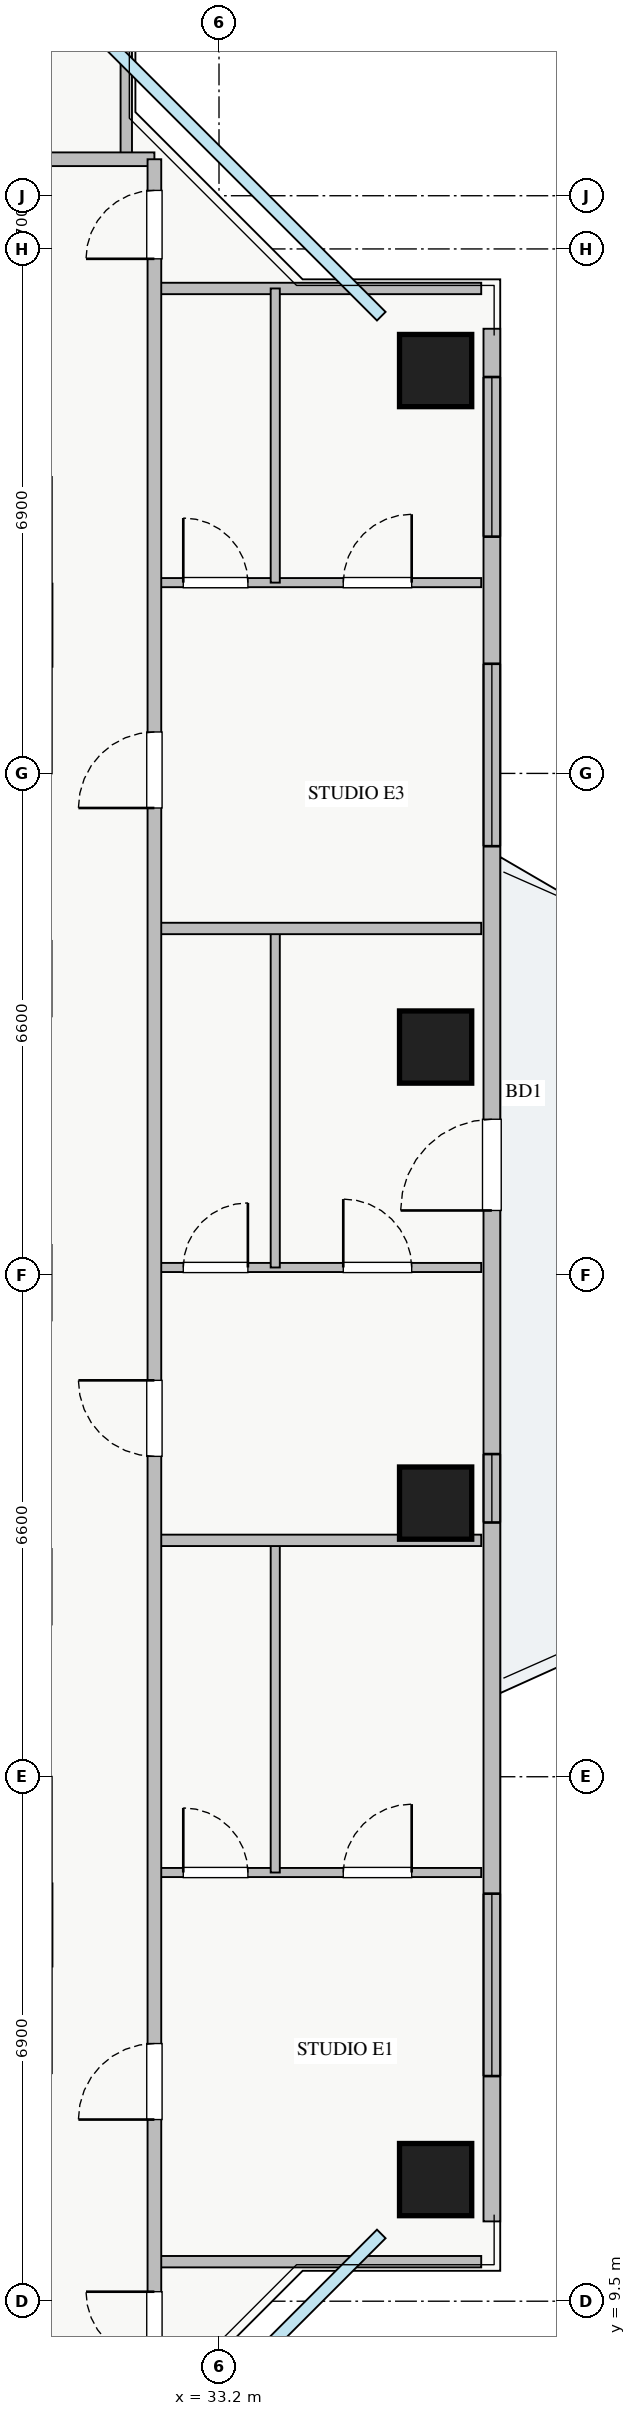
"""IFC4 building model, lengths in metres.
Left out: names, types, materials, properties, quantities, classifications, styles, units other than length and angle.
Written with IfcOpenShell. Run it as: python <this file> out.ifc"""

import sys

from ifc_helpers import new_model, si_unit, direction, frame, frame_2d, origin, origin_2d, place, context, subcontext, project, spatial, rectangle, extrude, source, transform, mapped, element, fill, save


model = new_model("IFC4")
c1 = context("Model", 3, precision=1e-05, world=origin(), true_north=direction((0.0, 1.0)))
c2 = subcontext(c1, "Body", "Model", "MODEL_VIEW")
j1 = project(units=[si_unit("LENGTHUNIT", "METRE"), si_unit("PLANEANGLEUNIT", "RADIAN")], contexts=[c1])
p1 = place(None, origin())
s1 = spatial("IfcSite", under=j1, at=p1, CompositionType="ELEMENT")
p2 = place(p1, origin())
s2 = spatial("IfcBuilding", under=s1, at=p2, CompositionType="ELEMENT")
p3 = place(p2, frame((0.0, 0.0, 179.5)))
s3 = spatial("IfcBuildingStorey", under=s2, at=p3, CompositionType="ELEMENT", Elevation=179.5)
m1 = source(origin(), c2, "Body", "SweptSolid", [
    extrude(rectangle(XDim=0.95, YDim=0.95, at=origin_2d()), origin(), (0.0, 0.0, 1.0), 3.25),
])
for number, where, z_axis, x_axis in (
    (1, (36.05, 11.1, 0.0), (0.0, 0.0, 1.0), (1.0, 0.0, 0.0)),
    (2, (36.05, 20.0, 0.0), (0.0, 0.0, 1.0), (1.0, 0.0, 0.0)),
    (3, (36.05, 26.0, 0.0), (0.0, 0.0, 1.0), (1.0, 0.0, 0.0)),
    (4, (36.05, 34.9, 0.0), (0.0, 0.0, 1.0), (1.0, 0.0, 0.0)),
):
    element("IfcColumn", number, at=place(p3, frame(where, z_axis=z_axis, x_axis=x_axis)), inside=s3, PredefinedType="COLUMN", context=c2, shape_type="MappedRepresentation", body=[
        mapped(m1, transform((0.0, 0.0, 0.0), x_axis=(1.0, 0.0, 0.0), y_axis=(0.0, 1.0, 0.0), z_axis=(0.0, 0.0, 1.0), scale=1.0)),
    ])
p4 = place(p3, frame((36.79, 10.55, 0.0), z_axis=(0.0, 0.0, 1.0), x_axis=(0.0, 1.0, 0.0)))
e5 = element("IfcWall", 5, at=p4, inside=s3, PredefinedType="STANDARD", context=c2, shape_type="SweptSolid", body=[
    extrude(rectangle(XDim=24.9, YDim=0.22, at=frame_2d((12.45, 0.0))), origin(), (0.0, 0.0, 1.0), 2.61),
])
p5 = place(p4, frame((13.3, 0.0, 0.0)))
e6 = element("IfcOpeningElement", 6, at=p5, cuts=e5, PredefinedType="OPENING", context=c2, shape_type="SweptSolid", body=[
    extrude(rectangle(XDim=1.2, YDim=2.1, at=frame_2d((0.6, 1.05))), frame((0.0, 0.12, 0.0), z_axis=(0.0, -1.0, 0.0), x_axis=(1.0, 0.0, 0.0)), (0.0, 0.0, 1.0), 0.24),
])
p6 = place(p4, frame((1.912, 0.0, 0.9)))
e7 = element("IfcOpeningElement", 7, at=p6, cuts=e5, PredefinedType="OPENING", context=c2, shape_type="SweptSolid", body=[
    extrude(rectangle(XDim=2.4, YDim=1.48, at=frame_2d((1.2, 0.74))), frame((0.0, 0.12, 0.0), z_axis=(0.0, -1.0, 0.0), x_axis=(1.0, 0.0, 0.0)), (0.0, 0.0, 1.0), 0.24),
])
p7 = place(p4, frame((22.165, 0.0, 0.9)))
e8 = element("IfcOpeningElement", 8, at=p7, cuts=e5, PredefinedType="OPENING", context=c2, shape_type="SweptSolid", body=[
    extrude(rectangle(XDim=2.1, YDim=1.5, at=frame_2d((1.05, 0.75))), frame((0.0, 0.12, 0.0), z_axis=(0.0, -1.0, 0.0), x_axis=(1.0, 0.0, 0.0)), (0.0, 0.0, 1.0), 0.24),
])
p8 = place(p4, frame((18.093, 0.0, 0.9)))
e9 = element("IfcOpeningElement", 9, at=p8, cuts=e5, PredefinedType="OPENING", context=c2, shape_type="SweptSolid", body=[
    extrude(rectangle(XDim=2.4, YDim=1.5, at=frame_2d((1.2, 0.75))), frame((0.0, 0.12, 0.0), z_axis=(0.0, -1.0, 0.0), x_axis=(1.0, 0.0, 0.0)), (0.0, 0.0, 1.0), 0.24),
])
p9 = place(p4, frame((9.195, 0.0, 0.9)))
e10 = element("IfcOpeningElement", 10, at=p9, cuts=e5, PredefinedType="OPENING", context=c2, shape_type="SweptSolid", body=[
    extrude(rectangle(XDim=0.9, YDim=1.2, at=frame_2d((0.45, 0.6))), frame((0.0, 0.12, 0.0), z_axis=(0.0, -1.0, 0.0), x_axis=(1.0, 0.0, 0.0)), (0.0, 0.0, 1.0), 0.24),
])
p10 = place(p3, frame((31.98, 37.68, 0.0), z_axis=(0.0, 0.0, 1.0), x_axis=(0.0, 1.0, 0.0)))
e11 = element("IfcWall", 11, at=p10, inside=s3, PredefinedType="PARTITIONING", context=c2, shape_type="SweptSolid", body=[
    extrude(rectangle(XDim=2.97, YDim=0.15, at=frame_2d((1.485, 0.0))), origin(), (0.0, 0.0, 1.0), 3.07),
])
p11 = place(p3, frame((8.72, 37.68, 0.0), z_axis=(0.0, 0.0, 1.0), x_axis=(1.0, 0.0, 0.0)))
e12 = element("IfcWall", 12, at=p11, inside=s3, PredefinedType="PARTITIONING", context=c2, shape_type="SweptSolid", body=[
    extrude(rectangle(XDim=23.63, YDim=0.18, at=frame_2d((11.815, 0.0))), origin(), (0.0, 0.0, 1.0), 3.07),
])
p12 = place(p11, frame((2.83, 0.0, 0.0)))
e13 = element("IfcOpeningElement", 13, at=p12, cuts=e12, PredefinedType="OPENING", context=c2, shape_type="SweptSolid", body=[
    extrude(rectangle(XDim=1.0, YDim=2.05, at=frame_2d((0.5, 1.025))), frame((0.0, 0.1, 0.0), z_axis=(0.0, -1.0, 0.0), x_axis=(1.0, 0.0, 0.0)), (0.0, 0.0, 1.0), 0.2),
])
p13 = place(p11, frame((8.02, 0.0, 0.0)))
e14 = element("IfcOpeningElement", 14, at=p13, cuts=e12, PredefinedType="OPENING", context=c2, shape_type="SweptSolid", body=[
    extrude(rectangle(XDim=1.0, YDim=2.05, at=frame_2d((0.5, 1.025))), frame((0.0, 0.1, 0.0), z_axis=(0.0, -1.0, 0.0), x_axis=(1.0, 0.0, 0.0)), (0.0, 0.0, 1.0), 0.2),
])
p14 = place(p11, frame((13.41, 0.0, 0.0)))
e15 = element("IfcOpeningElement", 15, at=p14, cuts=e12, PredefinedType="OPENING", context=c2, shape_type="SweptSolid", body=[
    extrude(rectangle(XDim=1.0, YDim=2.05, at=frame_2d((0.5, 1.025))), frame((0.0, 0.1, 0.0), z_axis=(0.0, -1.0, 0.0), x_axis=(1.0, 0.0, 0.0)), (0.0, 0.0, 1.0), 0.2),
])
p15 = place(p11, frame((19.85, 0.0, 0.0)))
e16 = element("IfcOpeningElement", 16, at=p15, cuts=e12, PredefinedType="OPENING", context=c2, shape_type="SweptSolid", body=[
    extrude(rectangle(XDim=1.0, YDim=2.05, at=frame_2d((0.5, 1.025))), frame((0.0, 0.1, 0.0), z_axis=(0.0, -1.0, 0.0), x_axis=(1.0, 0.0, 0.0)), (0.0, 0.0, 1.0), 0.2),
])
for number, where, z_axis, x_axis in (
    (17, (32.35, 35.98, 0.0), (0.0, 0.0, 1.0), (1.0, 0.0, 0.0)),
    (18, (32.35, 10.02, 0.0), (0.0, 0.0, 1.0), (1.0, 0.0, 0.0)),
):
    element("IfcWall", number, at=place(p3, frame(where, z_axis=z_axis, x_axis=x_axis)), inside=s3, PredefinedType="PARTITIONING", context=c2, shape_type="SweptSolid", body=[
        extrude(rectangle(XDim=4.3, YDim=0.15, at=frame_2d((2.15, 0.0))), origin(), (0.0, 0.0, 1.0), 3.07),
    ])
p16 = place(p3, frame((32.35, 15.14, 0.0), z_axis=(0.0, 0.0, 1.0), x_axis=(1.0, 0.0, 0.0)))
e19 = element("IfcWall", 19, at=p16, inside=s3, PredefinedType="PLUMBINGWALL", context=c2, shape_type="SweptSolid", body=[
    extrude(rectangle(XDim=4.3, YDim=0.12, at=frame_2d((2.15, 0.0))), origin(), (0.0, 0.0, 1.0), 3.07),
])
p17 = place(p16, frame((0.38, 0.0, 0.0)))
e20 = element("IfcOpeningElement", 20, at=p17, cuts=e19, PredefinedType="OPENING", context=c2, shape_type="SweptSolid", body=[
    extrude(rectangle(XDim=0.85, YDim=2.05, at=frame_2d((0.425, 1.025))), frame((0.0, 0.07, 0.0), z_axis=(0.0, -1.0, 0.0), x_axis=(1.0, 0.0, 0.0)), (0.0, 0.0, 1.0), 0.14),
])
p18 = place(p16, frame((2.485, 0.0, 0.0)))
e21 = element("IfcOpeningElement", 21, at=p18, cuts=e19, PredefinedType="OPENING", context=c2, shape_type="SweptSolid", body=[
    extrude(rectangle(XDim=0.9, YDim=2.05, at=frame_2d((0.45, 1.025))), frame((0.0, 0.07, 0.0), z_axis=(0.0, -1.0, 0.0), x_axis=(1.0, 0.0, 0.0)), (0.0, 0.0, 1.0), 0.14),
])
p19 = place(p3, frame((33.94, 15.14, 0.0), z_axis=(0.0, 0.0, 1.0), x_axis=(0.0, 1.0, 0.0)))
e22 = element("IfcWall", 22, at=p19, inside=s3, PredefinedType="PLUMBINGWALL", context=c2, shape_type="SweptSolid", body=[
    extrude(rectangle(XDim=4.37, YDim=0.12, at=frame_2d((2.185, 0.0))), origin(), (0.0, 0.0, 1.0), 3.07),
])
p20 = place(p3, frame((32.35, 23.1, 0.0), z_axis=(0.0, 0.0, 1.0), x_axis=(1.0, 0.0, 0.0)))
e23 = element("IfcWall", 23, at=p20, inside=s3, PredefinedType="PLUMBINGWALL", context=c2, shape_type="SweptSolid", body=[
    extrude(rectangle(XDim=4.3, YDim=0.12, at=frame_2d((2.15, 0.0))), origin(), (0.0, 0.0, 1.0), 3.07),
])
p21 = place(p20, frame((0.38, 0.0, 0.0)))
e24 = element("IfcOpeningElement", 24, at=p21, cuts=e23, PredefinedType="OPENING", context=c2, shape_type="SweptSolid", body=[
    extrude(rectangle(XDim=0.85, YDim=2.05, at=frame_2d((0.425, 1.025))), frame((0.0, 0.07, 0.0), z_axis=(0.0, -1.0, 0.0), x_axis=(1.0, 0.0, 0.0)), (0.0, 0.0, 1.0), 0.14),
])
p22 = place(p20, frame((2.485, 0.0, 0.0)))
e25 = element("IfcOpeningElement", 25, at=p22, cuts=e23, PredefinedType="OPENING", context=c2, shape_type="SweptSolid", body=[
    extrude(rectangle(XDim=0.9, YDim=2.05, at=frame_2d((0.45, 1.025))), frame((0.0, 0.07, 0.0), z_axis=(0.0, -1.0, 0.0), x_axis=(1.0, 0.0, 0.0)), (0.0, 0.0, 1.0), 0.14),
])
p23 = place(p3, frame((33.94, 23.1, 0.0), z_axis=(0.0, 0.0, 1.0), x_axis=(0.0, 1.0, 0.0)))
e26 = element("IfcWall", 26, at=p23, inside=s3, PredefinedType="PLUMBINGWALL", context=c2, shape_type="SweptSolid", body=[
    extrude(rectangle(XDim=4.46, YDim=0.12, at=frame_2d((2.23, 0.0))), origin(), (0.0, 0.0, 1.0), 3.07),
])
p24 = place(p3, frame((32.35, 19.51, 0.0), z_axis=(0.0, 0.0, 1.0), x_axis=(1.0, 0.0, 0.0)))
e27 = element("IfcWall", 27, at=p24, inside=s3, PredefinedType="PARTITIONING", context=c2, shape_type="SweptSolid", body=[
    extrude(rectangle(XDim=4.3, YDim=0.15, at=frame_2d((2.15, 0.0))), origin(), (0.0, 0.0, 1.0), 3.07),
])
p25 = place(p3, frame((32.35, 32.11, 0.0), z_axis=(0.0, 0.0, 1.0), x_axis=(1.0, 0.0, 0.0)))
e28 = element("IfcWall", 28, at=p25, inside=s3, PredefinedType="PLUMBINGWALL", context=c2, shape_type="SweptSolid", body=[
    extrude(rectangle(XDim=4.3, YDim=0.12, at=frame_2d((2.15, 0.0))), origin(), (0.0, 0.0, 1.0), 3.07),
])
p26 = place(p25, frame((0.38, 0.0, 0.0)))
e29 = element("IfcOpeningElement", 29, at=p26, cuts=e28, PredefinedType="OPENING", context=c2, shape_type="SweptSolid", body=[
    extrude(rectangle(XDim=0.85, YDim=2.05, at=frame_2d((0.425, 1.025))), frame((0.0, 0.07, 0.0), z_axis=(0.0, -1.0, 0.0), x_axis=(1.0, 0.0, 0.0)), (0.0, 0.0, 1.0), 0.14),
])
p27 = place(p25, frame((2.485, 0.0, 0.0)))
e30 = element("IfcOpeningElement", 30, at=p27, cuts=e28, PredefinedType="OPENING", context=c2, shape_type="SweptSolid", body=[
    extrude(rectangle(XDim=0.9, YDim=2.05, at=frame_2d((0.45, 1.025))), frame((0.0, 0.07, 0.0), z_axis=(0.0, -1.0, 0.0), x_axis=(1.0, 0.0, 0.0)), (0.0, 0.0, 1.0), 0.14),
])
p28 = place(p3, frame((33.94, 32.11, 0.0), z_axis=(0.0, 0.0, 1.0), x_axis=(0.0, 1.0, 0.0)))
e31 = element("IfcWall", 31, at=p28, inside=s3, PredefinedType="PLUMBINGWALL", context=c2, shape_type="SweptSolid", body=[
    extrude(rectangle(XDim=3.87, YDim=0.12, at=frame_2d((1.935, 0.0))), origin(), (0.0, 0.0, 1.0), 3.07),
])
p29 = place(p3, frame((32.35, 27.56, 0.0), z_axis=(0.0, 0.0, 1.0), x_axis=(1.0, 0.0, 0.0)))
e32 = element("IfcWall", 32, at=p29, inside=s3, PredefinedType="PARTITIONING", context=c2, shape_type="SweptSolid", body=[
    extrude(rectangle(XDim=4.3, YDim=0.15, at=frame_2d((2.15, 0.0))), origin(), (0.0, 0.0, 1.0), 3.07),
])
p30 = place(p3, frame((32.35, 8.31, 0.0), z_axis=(0.0, 0.0, 1.0), x_axis=(0.0, 1.0, 0.0)))
e33 = element("IfcWall", 33, at=p30, inside=s3, PredefinedType="PARTITIONING", context=c2, shape_type="SweptSolid", body=[
    extrude(rectangle(XDim=29.37, YDim=0.18, at=frame_2d((14.685, 0.0))), origin(), (0.0, 0.0, 1.0), 3.07),
])
p31 = place(p30, frame((28.06, 0.0, 0.0)))
e34 = element("IfcOpeningElement", 34, at=p31, cuts=e33, PredefinedType="OPENING", context=c2, shape_type="SweptSolid", body=[
    extrude(rectangle(XDim=0.9, YDim=2.05, at=frame_2d((0.45, 1.025))), frame((0.0, 0.1, 0.0), z_axis=(0.0, -1.0, 0.0), x_axis=(1.0, 0.0, 0.0)), (0.0, 0.0, 1.0), 0.2),
])
p32 = place(p30, frame((0.415, 0.0, 0.0)))
e35 = element("IfcOpeningElement", 35, at=p32, cuts=e33, PredefinedType="OPENING", context=c2, shape_type="SweptSolid", body=[
    extrude(rectangle(XDim=0.9, YDim=2.05, at=frame_2d((0.45, 1.025))), frame((0.0, 0.1, 0.0), z_axis=(0.0, -1.0, 0.0), x_axis=(1.0, 0.0, 0.0)), (0.0, 0.0, 1.0), 0.2),
])
p33 = place(p30, frame((3.58, 0.0, 0.0)))
e36 = element("IfcOpeningElement", 36, at=p33, cuts=e33, PredefinedType="OPENING", context=c2, shape_type="SweptSolid", body=[
    extrude(rectangle(XDim=1.0, YDim=2.05, at=frame_2d((0.5, 1.025))), frame((0.0, 0.1, 0.0), z_axis=(0.0, -1.0, 0.0), x_axis=(1.0, 0.0, 0.0)), (0.0, 0.0, 1.0), 0.2),
])
p34 = place(p30, frame((12.305, 0.0, 0.0)))
e37 = element("IfcOpeningElement", 37, at=p34, cuts=e33, PredefinedType="OPENING", context=c2, shape_type="SweptSolid", body=[
    extrude(rectangle(XDim=1.0, YDim=2.05, at=frame_2d((0.5, 1.025))), frame((0.0, 0.1, 0.0), z_axis=(0.0, -1.0, 0.0), x_axis=(1.0, 0.0, 0.0)), (0.0, 0.0, 1.0), 0.2),
])
p35 = place(p30, frame((20.835, 0.0, 0.0)))
e38 = element("IfcOpeningElement", 38, at=p35, cuts=e33, PredefinedType="OPENING", context=c2, shape_type="SweptSolid", body=[
    extrude(rectangle(XDim=1.0, YDim=2.05, at=frame_2d((0.5, 1.025))), frame((0.0, 0.1, 0.0), z_axis=(0.0, -1.0, 0.0), x_axis=(1.0, 0.0, 0.0)), (0.0, 0.0, 1.0), 0.2),
])
m2 = source(origin(), c2, "Body", "SweptSolid", [
    extrude(rectangle(XDim=1.2, YDim=2.1, at=frame_2d((0.6, 1.05))), frame((0.0, 0.025, 0.0), z_axis=(0.0, -1.0, 0.0), x_axis=(1.0, 0.0, 0.0)), (0.0, 0.0, 1.0), 0.05),
])
p36 = place(p5, origin())
e39 = element("IfcDoor", 39, at=p36, inside=s3, OperationType="SINGLE_SWING_LEFT", PredefinedType="DOOR", context=c2, shape_type="MappedRepresentation", body=[
    mapped(m2, transform((0.0, 0.0, 0.0), x_axis=(1.0, 0.0, 0.0), y_axis=(0.0, 1.0, 0.0), z_axis=(0.0, 0.0, 1.0), scale=1.0)),
])
fill(e6, e39)
m3 = source(origin(), c2, "Body", "SweptSolid", [
    extrude(rectangle(XDim=2.4, YDim=1.48, at=frame_2d((1.2, 0.74))), frame((0.0, 0.03, 0.0), z_axis=(0.0, -1.0, 0.0), x_axis=(1.0, 0.0, 0.0)), (0.0, 0.0, 1.0), 0.06),
])
p37 = place(p6, origin())
e40 = element("IfcWindow", 40, at=p37, inside=s3, PartitioningType="TRIPLE_PANEL_VERTICAL", PredefinedType="WINDOW", context=c2, shape_type="MappedRepresentation", body=[
    mapped(m3, transform((0.0, 0.0, 0.0), x_axis=(1.0, 0.0, 0.0), y_axis=(0.0, 1.0, 0.0), z_axis=(0.0, 0.0, 1.0), scale=1.0)),
])
fill(e7, e40)
m4 = source(origin(), c2, "Body", "SweptSolid", [
    extrude(rectangle(XDim=2.1, YDim=1.5, at=frame_2d((1.05, 0.75))), frame((0.0, 0.03, 0.0), z_axis=(0.0, -1.0, 0.0), x_axis=(1.0, 0.0, 0.0)), (0.0, 0.0, 1.0), 0.06),
])
p38 = place(p7, origin())
e41 = element("IfcWindow", 41, at=p38, inside=s3, PartitioningType="TRIPLE_PANEL_VERTICAL", PredefinedType="WINDOW", context=c2, shape_type="MappedRepresentation", body=[
    mapped(m4, transform((0.0, 0.0, 0.0), x_axis=(1.0, 0.0, 0.0), y_axis=(0.0, 1.0, 0.0), z_axis=(0.0, 0.0, 1.0), scale=1.0)),
])
fill(e8, e41)
m5 = source(origin(), c2, "Body", "SweptSolid", [
    extrude(rectangle(XDim=0.85, YDim=2.05, at=frame_2d((0.425, 1.025))), frame((0.0, 0.025, 0.0), z_axis=(0.0, -1.0, 0.0), x_axis=(1.0, 0.0, 0.0)), (0.0, 0.0, 1.0), 0.05),
])
p39 = place(p17, origin())
e42 = element("IfcDoor", 42, at=p39, inside=s3, OperationType="SINGLE_SWING_LEFT", PredefinedType="DOOR", context=c2, shape_type="MappedRepresentation", body=[
    mapped(m5, transform((0.0, 0.0, 0.0), x_axis=(1.0, 0.0, 0.0), y_axis=(0.0, 1.0, 0.0), z_axis=(0.0, 0.0, 1.0), scale=1.0)),
])
fill(e20, e42)
m6 = source(origin(), c2, "Body", "SweptSolid", [
    extrude(rectangle(XDim=0.9, YDim=2.05, at=frame_2d((0.45, 1.025))), frame((0.0, 0.025, 0.0), z_axis=(0.0, -1.0, 0.0), x_axis=(1.0, 0.0, 0.0)), (0.0, 0.0, 1.0), 0.05),
])
p40 = place(p18, origin())
e43 = element("IfcDoor", 43, at=p40, inside=s3, OperationType="SINGLE_SWING_RIGHT", PredefinedType="DOOR", context=c2, shape_type="MappedRepresentation", body=[
    mapped(m6, transform((0.0, 0.0, 0.0), x_axis=(1.0, 0.0, 0.0), y_axis=(0.0, 1.0, 0.0), z_axis=(0.0, 0.0, 1.0), scale=1.0)),
])
fill(e21, e43)
p41 = place(p21, origin())
e44 = element("IfcDoor", 44, at=p41, inside=s3, OperationType="SINGLE_SWING_RIGHT", PredefinedType="DOOR", context=c2, shape_type="MappedRepresentation", body=[
    mapped(m5, transform((0.0, 0.0, 0.0), x_axis=(1.0, 0.0, 0.0), y_axis=(0.0, 1.0, 0.0), z_axis=(0.0, 0.0, 1.0), scale=1.0)),
])
fill(e24, e44)
p42 = place(p22, origin())
e45 = element("IfcDoor", 45, at=p42, inside=s3, OperationType="SINGLE_SWING_LEFT", PredefinedType="DOOR", context=c2, shape_type="MappedRepresentation", body=[
    mapped(m6, transform((0.0, 0.0, 0.0), x_axis=(1.0, 0.0, 0.0), y_axis=(0.0, 1.0, 0.0), z_axis=(0.0, 0.0, 1.0), scale=1.0)),
])
fill(e25, e45)
p43 = place(p26, origin())
e46 = element("IfcDoor", 46, at=p43, inside=s3, OperationType="SINGLE_SWING_LEFT", PredefinedType="DOOR", context=c2, shape_type="MappedRepresentation", body=[
    mapped(m5, transform((0.0, 0.0, 0.0), x_axis=(1.0, 0.0, 0.0), y_axis=(0.0, 1.0, 0.0), z_axis=(0.0, 0.0, 1.0), scale=1.0)),
])
fill(e29, e46)
p44 = place(p27, origin())
e47 = element("IfcDoor", 47, at=p44, inside=s3, OperationType="SINGLE_SWING_RIGHT", PredefinedType="DOOR", context=c2, shape_type="MappedRepresentation", body=[
    mapped(m6, transform((0.0, 0.0, 0.0), x_axis=(1.0, 0.0, 0.0), y_axis=(0.0, 1.0, 0.0), z_axis=(0.0, 0.0, 1.0), scale=1.0)),
])
fill(e30, e47)
p45 = place(p31, origin())
e48 = element("IfcDoor", 48, at=p45, inside=s3, OperationType="SINGLE_SWING_LEFT", PredefinedType="DOOR", context=c2, shape_type="MappedRepresentation", body=[
    mapped(m6, transform((0.0, 0.0, 0.0), x_axis=(1.0, 0.0, 0.0), y_axis=(0.0, 1.0, 0.0), z_axis=(0.0, 0.0, 1.0), scale=1.0)),
])
fill(e34, e48)
p46 = place(p32, origin())
e49 = element("IfcDoor", 49, at=p46, inside=s3, OperationType="SINGLE_SWING_RIGHT", PredefinedType="DOOR", context=c2, shape_type="MappedRepresentation", body=[
    mapped(m6, transform((0.0, 0.0, 0.0), x_axis=(1.0, 0.0, 0.0), y_axis=(0.0, 1.0, 0.0), z_axis=(0.0, 0.0, 1.0), scale=1.0)),
])
fill(e35, e49)
m7 = source(origin(), c2, "Body", "SweptSolid", [
    extrude(rectangle(XDim=1.0, YDim=2.05, at=frame_2d((0.5, 1.025))), frame((0.0, 0.025, 0.0), z_axis=(0.0, -1.0, 0.0), x_axis=(1.0, 0.0, 0.0)), (0.0, 0.0, 1.0), 0.05),
])
p47 = place(p33, origin())
e50 = element("IfcDoor", 50, at=p47, inside=s3, OperationType="SINGLE_SWING_LEFT", PredefinedType="DOOR", context=c2, shape_type="MappedRepresentation", body=[
    mapped(m7, transform((0.0, 0.0, 0.0), x_axis=(1.0, 0.0, 0.0), y_axis=(0.0, 1.0, 0.0), z_axis=(0.0, 0.0, 1.0), scale=1.0)),
])
fill(e36, e50)
p48 = place(p34, origin())
e51 = element("IfcDoor", 51, at=p48, inside=s3, OperationType="SINGLE_SWING_RIGHT", PredefinedType="DOOR", context=c2, shape_type="MappedRepresentation", body=[
    mapped(m7, transform((0.0, 0.0, 0.0), x_axis=(1.0, 0.0, 0.0), y_axis=(0.0, 1.0, 0.0), z_axis=(0.0, 0.0, 1.0), scale=1.0)),
])
fill(e37, e51)
p49 = place(p35, origin())
e52 = element("IfcDoor", 52, at=p49, inside=s3, OperationType="SINGLE_SWING_LEFT", PredefinedType="DOOR", context=c2, shape_type="MappedRepresentation", body=[
    mapped(m7, transform((0.0, 0.0, 0.0), x_axis=(1.0, 0.0, 0.0), y_axis=(0.0, 1.0, 0.0), z_axis=(0.0, 0.0, 1.0), scale=1.0)),
])
fill(e38, e52)
m8 = source(origin(), c2, "Body", "SweptSolid", [
    extrude(rectangle(XDim=2.4, YDim=1.5, at=frame_2d((1.2, 0.75))), frame((0.0, 0.03, 0.0), z_axis=(0.0, -1.0, 0.0), x_axis=(1.0, 0.0, 0.0)), (0.0, 0.0, 1.0), 0.06),
])
p50 = place(p8, origin())
e53 = element("IfcWindow", 53, at=p50, inside=s3, PartitioningType="TRIPLE_PANEL_VERTICAL", PredefinedType="WINDOW", context=c2, shape_type="MappedRepresentation", body=[
    mapped(m8, transform((0.0, 0.0, 0.0), x_axis=(1.0, 0.0, 0.0), y_axis=(0.0, 1.0, 0.0), z_axis=(0.0, 0.0, 1.0), scale=1.0)),
])
fill(e9, e53)
m9 = source(origin(), c2, "Body", "SweptSolid", [
    extrude(rectangle(XDim=0.9, YDim=1.2, at=frame_2d((0.45, 0.6))), frame((0.0, 0.03, 0.0), z_axis=(0.0, -1.0, 0.0), x_axis=(1.0, 0.0, 0.0)), (0.0, 0.0, 1.0), 0.06),
])
p51 = place(p9, origin())
e54 = element("IfcWindow", 54, at=p51, inside=s3, PartitioningType="SINGLE_PANEL", PredefinedType="WINDOW", context=c2, shape_type="MappedRepresentation", body=[
    mapped(m9, transform((0.0, 0.0, 0.0), x_axis=(1.0, 0.0, 0.0), y_axis=(0.0, 1.0, 0.0), z_axis=(0.0, 0.0, 1.0), scale=1.0)),
])
fill(e10, e54)
save(model, sys.argv[1])
